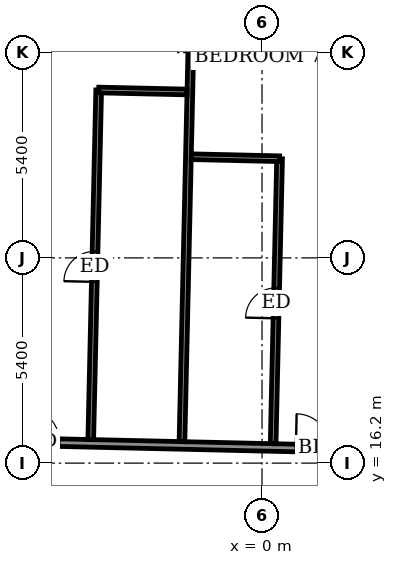
"""IFC4 building model, lengths in metres.
Left out: names, types, materials, properties, quantities, classifications, styles, units other than length and angle.
Written with IfcOpenShell. Run it as: python <this file> out.ifc"""

import sys

from ifc_helpers import new_model, si_unit, direction, frame, frame_2d, origin, place, context, subcontext, project, spatial, rectangle, extrude, element, fill, save


model = new_model("IFC4")
c1 = context("Model", 3, precision=1e-05, world=origin(), true_north=direction((0.0, 1.0)))
c2 = subcontext(c1, "Body", "Model", "MODEL_VIEW")
j1 = project(units=[si_unit("LENGTHUNIT", "METRE"), si_unit("PLANEANGLEUNIT", "RADIAN")], contexts=[c1])
p1 = place(None, origin())
s1 = spatial("IfcSite", under=j1, at=p1, CompositionType="ELEMENT")
p2 = place(p1, origin())
s2 = spatial("IfcBuilding", under=s1, at=p2, CompositionType="ELEMENT")
p3 = place(p2, frame((0.0, 0.0, 306.1)))
s3 = spatial("IfcBuildingStorey", under=s2, at=p3, CompositionType="ELEMENT", Elevation=306.1)
p4 = place(p3, frame((-30.652, 17.313, 0.0), z_axis=(0.0, 0.0, 1.0), x_axis=(0.999742623764, -0.02268669719, 0.0)))
e1 = element("IfcWall", 1, at=p4, inside=s3, PredefinedType="PARTITIONING", context=c2, shape_type="SweptSolid", body=[
    extrude(rectangle(XDim=58.8, YDim=0.2, at=frame_2d((29.4, 0.0))), origin(), (0.0, 0.0, 1.0), 3.05),
])
p5 = place(p4, frame((54.601, 0.0, 0.0)))
e2 = element("IfcOpeningElement", 2, at=p5, cuts=e1, PredefinedType="OPENING", context=c2, shape_type="SweptSolid", body=[
    extrude(rectangle(XDim=1.0, YDim=2.1, at=frame_2d((0.5, 1.05))), frame((0.0, 0.11, 0.0), z_axis=(0.0, -1.0, 0.0), x_axis=(1.0, 0.0, 0.0)), (0.0, 0.0, 1.0), 0.22),
])
p6 = place(p4, frame((49.35, 0.0, 0.0)))
e3 = element("IfcOpeningElement", 3, at=p6, cuts=e1, PredefinedType="OPENING", context=c2, shape_type="SweptSolid", body=[
    extrude(rectangle(XDim=0.9, YDim=2.1, at=frame_2d((0.45, 1.05))), frame((0.0, 0.11, 0.0), z_axis=(0.0, -1.0, 0.0), x_axis=(1.0, 0.0, 0.0)), (0.0, 0.0, 1.0), 0.22),
])
p7 = place(p4, frame((42.55, 0.0, 0.0)))
e4 = element("IfcOpeningElement", 4, at=p7, cuts=e1, PredefinedType="OPENING", context=c2, shape_type="SweptSolid", body=[
    extrude(rectangle(XDim=0.9, YDim=2.1, at=frame_2d((0.45, 1.05))), frame((0.0, 0.11, 0.0), z_axis=(0.0, -1.0, 0.0), x_axis=(1.0, 0.0, 0.0)), (0.0, 0.0, 1.0), 0.22),
])
p8 = place(p4, frame((40.475, 0.0, 0.0)))
e5 = element("IfcOpeningElement", 5, at=p8, cuts=e1, PredefinedType="OPENING", context=c2, shape_type="SweptSolid", body=[
    extrude(rectangle(XDim=0.9, YDim=2.1, at=frame_2d((0.45, 1.05))), frame((0.0, 0.11, 0.0), z_axis=(0.0, -1.0, 0.0), x_axis=(1.0, 0.0, 0.0)), (0.0, 0.0, 1.0), 0.22),
])
p9 = place(p4, frame((33.6, 0.0, 0.0)))
e6 = element("IfcOpeningElement", 6, at=p9, cuts=e1, PredefinedType="OPENING", context=c2, shape_type="SweptSolid", body=[
    extrude(rectangle(XDim=0.9, YDim=2.1, at=frame_2d((0.45, 1.05))), frame((0.0, 0.11, 0.0), z_axis=(0.0, -1.0, 0.0), x_axis=(1.0, 0.0, 0.0)), (0.0, 0.0, 1.0), 0.22),
])
p10 = place(p4, frame((31.55, 0.0, 0.0)))
e7 = element("IfcOpeningElement", 7, at=p10, cuts=e1, PredefinedType="OPENING", context=c2, shape_type="SweptSolid", body=[
    extrude(rectangle(XDim=0.9, YDim=2.1, at=frame_2d((0.45, 1.05))), frame((0.0, 0.11, 0.0), z_axis=(0.0, -1.0, 0.0), x_axis=(1.0, 0.0, 0.0)), (0.0, 0.0, 1.0), 0.22),
])
p11 = place(p4, frame((24.425, 0.0, 0.0)))
e8 = element("IfcOpeningElement", 8, at=p11, cuts=e1, PredefinedType="OPENING", context=c2, shape_type="SweptSolid", body=[
    extrude(rectangle(XDim=0.9, YDim=2.1, at=frame_2d((0.45, 1.05))), frame((0.0, 0.11, 0.0), z_axis=(0.0, -1.0, 0.0), x_axis=(1.0, 0.0, 0.0)), (0.0, 0.0, 1.0), 0.22),
])
p12 = place(p4, frame((22.05, 0.0, 0.0)))
e9 = element("IfcOpeningElement", 9, at=p12, cuts=e1, PredefinedType="OPENING", context=c2, shape_type="SweptSolid", body=[
    extrude(rectangle(XDim=0.9, YDim=2.1, at=frame_2d((0.45, 1.05))), frame((0.0, 0.11, 0.0), z_axis=(0.0, -1.0, 0.0), x_axis=(1.0, 0.0, 0.0)), (0.0, 0.0, 1.0), 0.22),
])
p13 = place(p4, frame((14.95, 0.0, 0.0)))
e10 = element("IfcOpeningElement", 10, at=p13, cuts=e1, PredefinedType="OPENING", context=c2, shape_type="SweptSolid", body=[
    extrude(rectangle(XDim=0.9, YDim=2.1, at=frame_2d((0.45, 1.05))), frame((0.0, 0.11, 0.0), z_axis=(0.0, -1.0, 0.0), x_axis=(1.0, 0.0, 0.0)), (0.0, 0.0, 1.0), 0.22),
])
p14 = place(p4, frame((12.525, 0.0, 0.0)))
e11 = element("IfcOpeningElement", 11, at=p14, cuts=e1, PredefinedType="OPENING", context=c2, shape_type="SweptSolid", body=[
    extrude(rectangle(XDim=0.9, YDim=2.1, at=frame_2d((0.45, 1.05))), frame((0.0, 0.11, 0.0), z_axis=(0.0, -1.0, 0.0), x_axis=(1.0, 0.0, 0.0)), (0.0, 0.0, 1.0), 0.22),
])
p15 = place(p4, frame((4.032, 0.0, 0.0)))
e12 = element("IfcOpeningElement", 12, at=p15, cuts=e1, PredefinedType="OPENING", context=c2, shape_type="SweptSolid", body=[
    extrude(rectangle(XDim=1.0, YDim=2.1, at=frame_2d((0.5, 1.05))), frame((0.0, 0.11, 0.0), z_axis=(0.0, -1.0, 0.0), x_axis=(1.0, 0.0, 0.0)), (0.0, 0.0, 1.0), 0.22),
])
p16 = place(p3, frame((-4.507, 16.82, 0.0), z_axis=(0.0, 0.0, 1.0), x_axis=(0.022717185456, 0.999741931443, 0.0)))
e13 = element("IfcWall", 13, at=p16, inside=s3, PredefinedType="PARTITIONING", context=c2, shape_type="SweptSolid", body=[
    extrude(rectangle(XDim=9.199, YDim=0.15, at=frame_2d((4.6, 0.0))), origin(), (0.0, 0.0, 1.0), 3.05),
])
p17 = place(p16, frame((4.15, 0.0, 0.0)))
e14 = element("IfcOpeningElement", 14, at=p17, cuts=e13, PredefinedType="OPENING", context=c2, shape_type="SweptSolid", body=[
    extrude(rectangle(XDim=0.8, YDim=2.1, at=frame_2d((0.4, 1.05))), frame((0.0, 0.085, 0.0), z_axis=(0.0, -1.0, 0.0), x_axis=(1.0, 0.0, 0.0)), (0.0, 0.0, 1.0), 0.17),
])
p18 = place(p3, frame((-2.107, 16.765, 0.0), z_axis=(0.0, 0.0, 1.0), x_axis=(0.022661029756, 0.999743205894, 0.0)))
e15 = element("IfcWall", 15, at=p18, inside=s3, PredefinedType="PARTITIONING", context=c2, shape_type="SweptSolid", body=[
    extrude(rectangle(XDim=12.4, YDim=0.15, at=frame_2d((6.2, 0.0))), origin(), (0.0, 0.0, 1.0), 2.5),
])
p19 = place(p3, frame((0.292, 16.711, 0.0), z_axis=(0.0, 0.0, 1.0), x_axis=(0.022656334507, 0.999743312309, 0.0)))
e16 = element("IfcWall", 16, at=p19, inside=s3, PredefinedType="PARTITIONING", context=c2, shape_type="SweptSolid", body=[
    extrude(rectangle(XDim=7.5, YDim=0.15, at=frame_2d((3.75, 0.0))), origin(), (0.0, 0.0, 1.0), 3.05),
])
p20 = place(p19, frame((3.3, 0.0, 0.0)))
e17 = element("IfcOpeningElement", 17, at=p20, cuts=e16, PredefinedType="OPENING", context=c2, shape_type="SweptSolid", body=[
    extrude(rectangle(XDim=0.8, YDim=2.1, at=frame_2d((0.4, 1.05))), frame((0.0, 0.085, 0.0), z_axis=(0.0, -1.0, 0.0), x_axis=(1.0, 0.0, 0.0)), (0.0, 0.0, 1.0), 0.17),
])
p21 = place(p3, frame((-1.862, 24.262, 0.0), z_axis=(0.0, 0.0, 1.0), x_axis=(0.999740260747, -0.02279059109, 0.0)))
e18 = element("IfcWall", 18, at=p21, inside=s3, PredefinedType="PARTITIONING", context=c2, shape_type="SweptSolid", body=[
    extrude(rectangle(XDim=2.324, YDim=0.15, at=frame_2d((1.162, 0.0))), origin(), (0.0, 0.0, 1.0), 3.05),
])
p22 = place(p3, frame((-4.298, 26.017, 0.0), z_axis=(0.0, 0.0, 1.0), x_axis=(0.999750007167, -0.022358961731, 0.0)))
e19 = element("IfcWall", 19, at=p22, inside=s3, PredefinedType="PARTITIONING", context=c2, shape_type="SweptSolid", body=[
    extrude(rectangle(XDim=2.326, YDim=0.15, at=frame_2d((1.163, 0.0))), origin(), (0.0, 0.0, 1.0), 3.05),
])
p23 = place(p10, origin())
e20 = element("IfcDoor", 20, at=p23, inside=s3, OperationType="SINGLE_SWING_LEFT", PredefinedType="DOOR", context=c2, shape_type="SweptSolid", body=[
    extrude(rectangle(XDim=0.9, YDim=2.1, at=frame_2d((0.45, 1.05))), frame((0.0, 0.025, 0.0), z_axis=(0.0, -1.0, 0.0), x_axis=(1.0, 0.0, 0.0)), (0.0, 0.0, 1.0), 0.05),
])
fill(e7, e20)
p24 = place(p20, origin())
e21 = element("IfcDoor", 21, at=p24, inside=s3, OperationType="SINGLE_SWING_LEFT", PredefinedType="DOOR", context=c2, shape_type="SweptSolid", body=[
    extrude(rectangle(XDim=0.8, YDim=2.1, at=frame_2d((0.4, 1.05))), frame((0.0, 0.025, 0.0), z_axis=(0.0, -1.0, 0.0), x_axis=(1.0, 0.0, 0.0)), (0.0, 0.0, 1.0), 0.05),
])
fill(e17, e21)
p25 = place(p11, origin())
e22 = element("IfcDoor", 22, at=p25, inside=s3, OperationType="SINGLE_SWING_RIGHT", PredefinedType="DOOR", context=c2, shape_type="SweptSolid", body=[
    extrude(rectangle(XDim=0.9, YDim=2.1, at=frame_2d((0.45, 1.05))), frame((0.0, 0.025, 0.0), z_axis=(0.0, -1.0, 0.0), x_axis=(1.0, 0.0, 0.0)), (0.0, 0.0, 1.0), 0.05),
])
fill(e8, e22)
p26 = place(p17, origin())
e23 = element("IfcDoor", 23, at=p26, inside=s3, OperationType="SINGLE_SWING_RIGHT", PredefinedType="DOOR", context=c2, shape_type="SweptSolid", body=[
    extrude(rectangle(XDim=0.8, YDim=2.1, at=frame_2d((0.4, 1.05))), frame((0.0, 0.025, 0.0), z_axis=(0.0, -1.0, 0.0), x_axis=(1.0, 0.0, 0.0)), (0.0, 0.0, 1.0), 0.05),
])
fill(e14, e23)
save(model, sys.argv[1])
